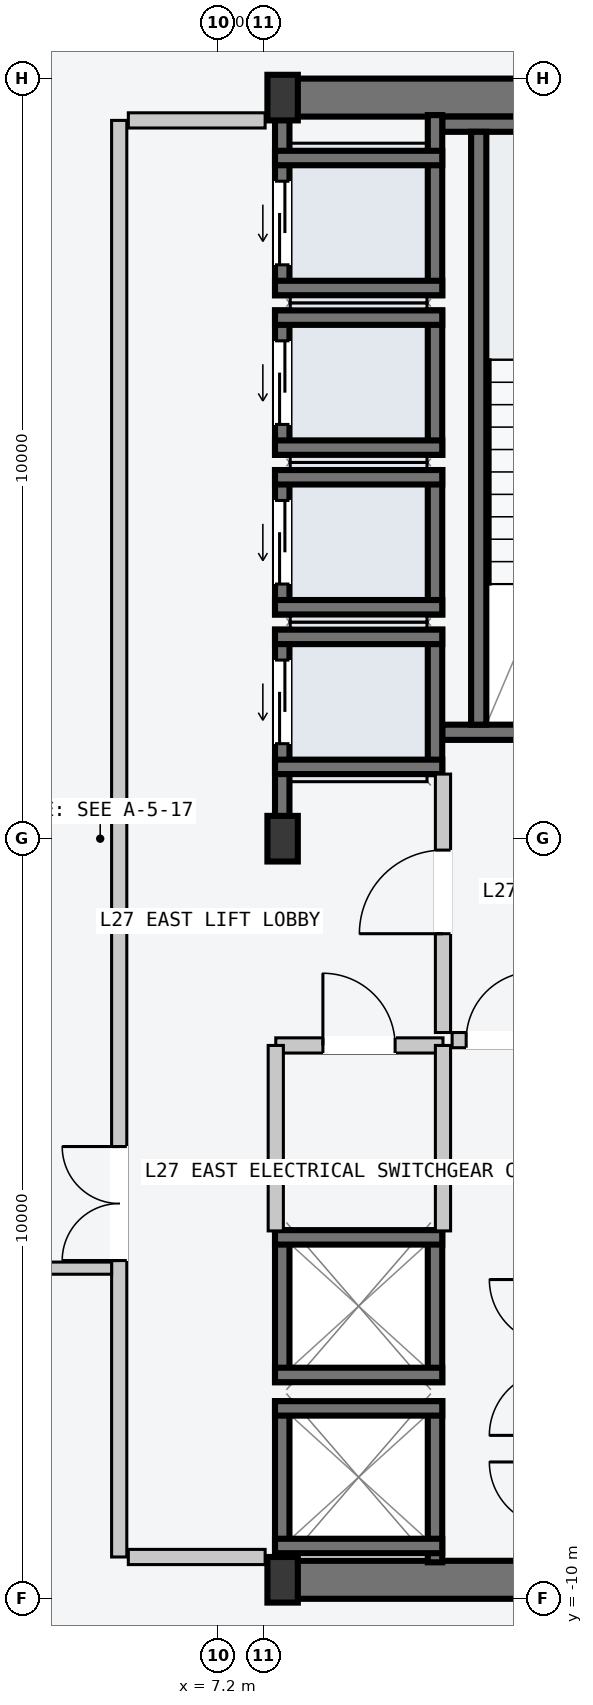
"""IFC4 building model, lengths in metres.
Left out: names, types, materials, properties, quantities, classifications, styles, units other than length and angle.
Written with IfcOpenShell. Run it as: python <this file> out.ifc"""

import sys

from ifc_helpers import new_model, si_unit, direction, frame, frame_2d, origin, origin_2d, place, context, subcontext, project, spatial, rectangle, i_section, extrude, element, fill, save


model = new_model("IFC4")
c1 = context("Model", 3, precision=1e-05, world=origin(), true_north=direction((0.0, 1.0)))
c2 = subcontext(c1, "Body", "Model", "MODEL_VIEW")
j1 = project(units=[si_unit("LENGTHUNIT", "METRE"), si_unit("PLANEANGLEUNIT", "RADIAN")], contexts=[c1])
p1 = place(None, origin())
s1 = spatial("IfcSite", under=j1, at=p1, CompositionType="ELEMENT")
p2 = place(p1, origin())
s2 = spatial("IfcBuilding", under=s1, at=p2, CompositionType="ELEMENT")
p3 = place(p2, frame((0.0, 0.0, 106.2)))
s3 = spatial("IfcBuildingStorey", under=s2, at=p3, CompositionType="ELEMENT", Elevation=106.2)
for number, where, z_axis, x_axis in (
    (1, (8.07, -9.75, -0.2), (0.0, 0.0, 1.0), (1.0, 0.0, 0.0)),
    (2, (8.07, 9.75, -0.2), (0.0, 0.0, 1.0), (1.0, 0.0, 0.0)),
):
    element("IfcWall", number, at=place(p3, frame(where, z_axis=z_axis, x_axis=x_axis)), inside=s3, PredefinedType="SHEAR", context=c2, shape_type="SweptSolid", body=[
        extrude(rectangle(XDim=6.46, YDim=0.5, at=frame_2d((3.23, 0.0))), origin(), (0.0, 0.0, 1.0), 3.6),
    ])
p4 = place(p3, frame((10.15, 1.4, -0.2), z_axis=(0.0, 0.0, 1.0), x_axis=(1.0, 0.0, 0.0)))
e3 = element("IfcWall", 3, at=p4, inside=s3, PredefinedType="SOLIDWALL", context=c2, shape_type="SweptSolid", body=[
    extrude(rectangle(XDim=4.1, YDim=0.2, at=frame_2d((2.05, 0.0))), origin(), (0.0, 0.0, 1.0), 3.6),
])
p5 = place(p4, frame((1.5, 0.0, 0.2)))
e4 = element("IfcOpeningElement", 4, at=p5, cuts=e3, PredefinedType="OPENING", context=c2, shape_type="SweptSolid", body=[
    extrude(rectangle(XDim=1.12, YDim=2.18, at=frame_2d((0.56, 1.09))), frame((0.0, 0.11, 0.0), z_axis=(0.0, -1.0, 0.0), x_axis=(1.0, 0.0, 0.0)), (0.0, 0.0, 1.0), 0.22),
])
p6 = place(p3, frame((10.15, 9.4, -0.2), z_axis=(0.0, 0.0, 1.0), x_axis=(1.0, 0.0, 0.0)))
e5 = element("IfcWall", 5, at=p6, inside=s3, PredefinedType="SOLIDWALL", context=c2, shape_type="SweptSolid", body=[
    extrude(rectangle(XDim=4.1, YDim=0.2, at=frame_2d((2.05, 0.0))), origin(), (0.0, 0.0, 1.0), 3.6),
])
p7 = place(p3, frame((10.63, 1.5, -0.2), z_axis=(0.0, 0.0, 1.0), x_axis=(0.0, 1.0, 0.0)))
e6 = element("IfcWall", 6, at=p7, inside=s3, PredefinedType="SOLIDWALL", context=c2, shape_type="SweptSolid", body=[
    extrude(rectangle(XDim=7.8, YDim=0.2, at=frame_2d((3.9, 0.0))), origin(), (0.0, 0.0, 1.0), 3.6),
])
for number, where, z_axis, x_axis in (
    (7, (8.05, -9.75, 0.0), (0.0, 0.0, 1.0), (1.0, 0.0, 0.0)),
    (8, (8.05, 0.0, 0.0), (0.0, 0.0, 1.0), (1.0, 0.0, 0.0)),
    (9, (8.05, 9.75, 0.0), (0.0, 0.0, 1.0), (1.0, 0.0, 0.0)),
):
    element("IfcColumn", number, at=place(p3, frame(where, z_axis=z_axis, x_axis=x_axis)), inside=s3, PredefinedType="COLUMN", context=c2, shape_type="SweptSolid", body=[
        extrude(i_section(OverallWidth=0.4, OverallDepth=0.6, WebThickness=0.022, FlangeThickness=0.036, at=origin_2d()), origin(), (0.0, 0.0, 1.0), 3.6),
    ])
p8 = place(p3, frame((8.045, 0.21, -0.2), z_axis=(0.0, 0.0, 1.0), x_axis=(0.0, 1.0, 0.0)))
e10 = element("IfcWall", 10, at=p8, inside=s3, PredefinedType="SOLIDWALL", context=c2, shape_type="SweptSolid", body=[
    extrude(rectangle(XDim=2.54, YDim=0.19, at=frame_2d((1.27, 0.0))), origin(), (0.0, 0.0, 1.0), 3.6),
])
p9 = place(p8, frame((1.04, 0.0, 0.2)))
e11 = element("IfcOpeningElement", 11, at=p9, cuts=e10, PredefinedType="OPENING", context=c2, shape_type="SweptSolid", body=[
    extrude(rectangle(XDim=1.1, YDim=2.2, at=frame_2d((0.55, 1.1))), frame((0.0, 0.105, 0.0), z_axis=(0.0, -1.0, 0.0), x_axis=(1.0, 0.0, 0.0)), (0.0, 0.0, 1.0), 0.21),
])
p10 = place(p3, frame((10.055, 0.85, -0.2), z_axis=(0.0, 0.0, 1.0), x_axis=(0.0, 1.0, 0.0)))
e12 = element("IfcWall", 12, at=p10, inside=s3, PredefinedType="SOLIDWALL", context=c2, shape_type="SweptSolid", body=[
    extrude(rectangle(XDim=1.9, YDim=0.19, at=frame_2d((0.95, 0.0))), origin(), (0.0, 0.0, 1.0), 3.6),
])
for number, where, z_axis, x_axis in (
    (13, (7.95, 2.655, -0.2), (0.0, 0.0, 1.0), (1.0, 0.0, 0.0)),
    (14, (7.95, 0.945, -0.2), (0.0, 0.0, 1.0), (1.0, 0.0, 0.0)),
):
    element("IfcWall", number, at=place(p3, frame(where, z_axis=z_axis, x_axis=x_axis)), inside=s3, PredefinedType="SOLIDWALL", context=c2, shape_type="SweptSolid", body=[
        extrude(rectangle(XDim=2.2, YDim=0.19, at=frame_2d((1.1, 0.0))), origin(), (0.0, 0.0, 1.0), 3.6),
    ])
p11 = place(p3, frame((8.045, 2.95, -0.2), z_axis=(0.0, 0.0, 1.0), x_axis=(0.0, 1.0, 0.0)))
e15 = element("IfcWall", 15, at=p11, inside=s3, PredefinedType="SOLIDWALL", context=c2, shape_type="SweptSolid", body=[
    extrude(rectangle(XDim=1.9, YDim=0.19, at=frame_2d((0.95, 0.0))), origin(), (0.0, 0.0, 1.0), 3.6),
])
p12 = place(p11, frame((0.4, 0.0, 0.2)))
e16 = element("IfcOpeningElement", 16, at=p12, cuts=e15, PredefinedType="OPENING", context=c2, shape_type="SweptSolid", body=[
    extrude(rectangle(XDim=1.1, YDim=2.2, at=frame_2d((0.55, 1.1))), frame((0.0, 0.105, 0.0), z_axis=(0.0, -1.0, 0.0), x_axis=(1.0, 0.0, 0.0)), (0.0, 0.0, 1.0), 0.21),
])
p13 = place(p3, frame((10.055, 2.95, -0.2), z_axis=(0.0, 0.0, 1.0), x_axis=(0.0, 1.0, 0.0)))
e17 = element("IfcWall", 17, at=p13, inside=s3, PredefinedType="SOLIDWALL", context=c2, shape_type="SweptSolid", body=[
    extrude(rectangle(XDim=1.9, YDim=0.19, at=frame_2d((0.95, 0.0))), origin(), (0.0, 0.0, 1.0), 3.6),
])
for number, where, z_axis, x_axis in (
    (18, (7.95, 4.755, -0.2), (0.0, 0.0, 1.0), (1.0, 0.0, 0.0)),
    (19, (7.95, 3.045, -0.2), (0.0, 0.0, 1.0), (1.0, 0.0, 0.0)),
):
    element("IfcWall", number, at=place(p3, frame(where, z_axis=z_axis, x_axis=x_axis)), inside=s3, PredefinedType="SOLIDWALL", context=c2, shape_type="SweptSolid", body=[
        extrude(rectangle(XDim=2.2, YDim=0.19, at=frame_2d((1.1, 0.0))), origin(), (0.0, 0.0, 1.0), 3.6),
    ])
p14 = place(p3, frame((8.045, 5.05, -0.2), z_axis=(0.0, 0.0, 1.0), x_axis=(0.0, 1.0, 0.0)))
e20 = element("IfcWall", 20, at=p14, inside=s3, PredefinedType="SOLIDWALL", context=c2, shape_type="SweptSolid", body=[
    extrude(rectangle(XDim=1.9, YDim=0.19, at=frame_2d((0.95, 0.0))), origin(), (0.0, 0.0, 1.0), 3.6),
])
p15 = place(p14, frame((0.4, 0.0, 0.2)))
e21 = element("IfcOpeningElement", 21, at=p15, cuts=e20, PredefinedType="OPENING", context=c2, shape_type="SweptSolid", body=[
    extrude(rectangle(XDim=1.1, YDim=2.2, at=frame_2d((0.55, 1.1))), frame((0.0, 0.105, 0.0), z_axis=(0.0, -1.0, 0.0), x_axis=(1.0, 0.0, 0.0)), (0.0, 0.0, 1.0), 0.21),
])
p16 = place(p3, frame((10.055, 5.05, -0.2), z_axis=(0.0, 0.0, 1.0), x_axis=(0.0, 1.0, 0.0)))
e22 = element("IfcWall", 22, at=p16, inside=s3, PredefinedType="SOLIDWALL", context=c2, shape_type="SweptSolid", body=[
    extrude(rectangle(XDim=1.9, YDim=0.19, at=frame_2d((0.95, 0.0))), origin(), (0.0, 0.0, 1.0), 3.6),
])
for number, where, z_axis, x_axis in (
    (23, (7.95, 6.855, -0.2), (0.0, 0.0, 1.0), (1.0, 0.0, 0.0)),
    (24, (7.95, 5.145, -0.2), (0.0, 0.0, 1.0), (1.0, 0.0, 0.0)),
):
    element("IfcWall", number, at=place(p3, frame(where, z_axis=z_axis, x_axis=x_axis)), inside=s3, PredefinedType="SOLIDWALL", context=c2, shape_type="SweptSolid", body=[
        extrude(rectangle(XDim=2.2, YDim=0.19, at=frame_2d((1.1, 0.0))), origin(), (0.0, 0.0, 1.0), 3.6),
    ])
p17 = place(p3, frame((8.045, 7.15, -0.2), z_axis=(0.0, 0.0, 1.0), x_axis=(0.0, 1.0, 0.0)))
e25 = element("IfcWall", 25, at=p17, inside=s3, PredefinedType="SOLIDWALL", context=c2, shape_type="SweptSolid", body=[
    extrude(rectangle(XDim=2.37, YDim=0.19, at=frame_2d((1.185, 0.0))), origin(), (0.0, 0.0, 1.0), 3.6),
])
p18 = place(p17, frame((0.4, 0.0, 0.2)))
e26 = element("IfcOpeningElement", 26, at=p18, cuts=e25, PredefinedType="OPENING", context=c2, shape_type="SweptSolid", body=[
    extrude(rectangle(XDim=1.1, YDim=2.2, at=frame_2d((0.55, 1.1))), frame((0.0, 0.105, 0.0), z_axis=(0.0, -1.0, 0.0), x_axis=(1.0, 0.0, 0.0)), (0.0, 0.0, 1.0), 0.21),
])
p19 = place(p3, frame((10.055, 7.15, -0.2), z_axis=(0.0, 0.0, 1.0), x_axis=(0.0, 1.0, 0.0)))
e27 = element("IfcWall", 27, at=p19, inside=s3, PredefinedType="SOLIDWALL", context=c2, shape_type="SweptSolid", body=[
    extrude(rectangle(XDim=2.37, YDim=0.19, at=frame_2d((1.185, 0.0))), origin(), (0.0, 0.0, 1.0), 3.6),
])
for number, where, z_axis, x_axis in (
    (28, (7.95, 8.955, -0.2), (0.0, 0.0, 1.0), (1.0, 0.0, 0.0)),
    (29, (7.95, 7.245, -0.2), (0.0, 0.0, 1.0), (1.0, 0.0, 0.0)),
):
    element("IfcWall", number, at=place(p3, frame(where, z_axis=z_axis, x_axis=x_axis)), inside=s3, PredefinedType="SOLIDWALL", context=c2, shape_type="SweptSolid", body=[
        extrude(rectangle(XDim=2.2, YDim=0.19, at=frame_2d((1.1, 0.0))), origin(), (0.0, 0.0, 1.0), 3.6),
    ])
for number, where, z_axis, x_axis in (
    (30, (8.045, -9.52, -0.2), (0.0, 0.0, 1.0), (0.0, 1.0, 0.0)),
    (31, (10.055, -9.52, -0.2), (0.0, 0.0, 1.0), (0.0, 1.0, 0.0)),
):
    element("IfcWall", number, at=place(p3, frame(where, z_axis=z_axis, x_axis=x_axis)), inside=s3, PredefinedType="SOLIDWALL", context=c2, shape_type="SweptSolid", body=[
        extrude(rectangle(XDim=2.12, YDim=0.19, at=frame_2d((1.06, 0.0))), origin(), (0.0, 0.0, 1.0), 3.6),
    ])
for number, where, z_axis, x_axis in (
    (32, (7.95, -7.495, -0.2), (0.0, 0.0, 1.0), (1.0, 0.0, 0.0)),
    (33, (7.95, -9.305, -0.2), (0.0, 0.0, 1.0), (1.0, 0.0, 0.0)),
):
    element("IfcWall", number, at=place(p3, frame(where, z_axis=z_axis, x_axis=x_axis)), inside=s3, PredefinedType="SOLIDWALL", context=c2, shape_type="SweptSolid", body=[
        extrude(rectangle(XDim=2.2, YDim=0.19, at=frame_2d((1.1, 0.0))), origin(), (0.0, 0.0, 1.0), 3.6),
    ])
for number, where, z_axis, x_axis in (
    (34, (8.045, -7.15, -0.2), (0.0, 0.0, 1.0), (0.0, 1.0, 0.0)),
    (35, (10.055, -7.15, -0.2), (0.0, 0.0, 1.0), (0.0, 1.0, 0.0)),
):
    element("IfcWall", number, at=place(p3, frame(where, z_axis=z_axis, x_axis=x_axis)), inside=s3, PredefinedType="SOLIDWALL", context=c2, shape_type="SweptSolid", body=[
        extrude(rectangle(XDim=2.0, YDim=0.19, at=frame_2d((1.0, 0.0))), origin(), (0.0, 0.0, 1.0), 3.6),
    ])
for number, where, z_axis, x_axis in (
    (36, (7.95, -5.245, -0.2), (0.0, 0.0, 1.0), (1.0, 0.0, 0.0)),
    (37, (7.95, -7.055, -0.2), (0.0, 0.0, 1.0), (1.0, 0.0, 0.0)),
):
    element("IfcWall", number, at=place(p3, frame(where, z_axis=z_axis, x_axis=x_axis)), inside=s3, PredefinedType="SOLIDWALL", context=c2, shape_type="SweptSolid", body=[
        extrude(rectangle(XDim=2.2, YDim=0.19, at=frame_2d((1.1, 0.0))), origin(), (0.0, 0.0, 1.0), 3.6),
    ])
p20 = place(p3, frame((5.9, -9.45, 0.0), z_axis=(0.0, 0.0, 1.0), x_axis=(0.0, 1.0, 0.0)))
e38 = element("IfcWall", 38, at=p20, inside=s3, PredefinedType="PARTITIONING", context=c2, shape_type="SweptSolid", body=[
    extrude(rectangle(XDim=18.9, YDim=0.2, at=frame_2d((9.45, 0.0))), origin(), (0.0, 0.0, 1.0), 3.4),
])
p21 = place(p20, frame((3.9, 0.0, 0.0)))
e39 = element("IfcOpeningElement", 39, at=p21, cuts=e38, PredefinedType="OPENING", context=c2, shape_type="SweptSolid", body=[
    extrude(rectangle(XDim=1.5, YDim=2.2, at=frame_2d((0.75, 1.1))), frame((0.0, 0.11, 0.0), z_axis=(0.0, -1.0, 0.0), x_axis=(1.0, 0.0, 0.0)), (0.0, 0.0, 1.0), 0.22),
])
for number, where, z_axis, x_axis in (
    (40, (6.02, -9.45, 0.0), (0.0, 0.0, 1.0), (1.0, 0.0, 0.0)),
    (41, (6.02, 9.45, 0.0), (0.0, 0.0, 1.0), (1.0, 0.0, 0.0)),
):
    element("IfcWall", number, at=place(p3, frame(where, z_axis=z_axis, x_axis=x_axis)), inside=s3, PredefinedType="PARTITIONING", context=c2, shape_type="SweptSolid", body=[
        extrude(rectangle(XDim=1.8, YDim=0.2, at=frame_2d((0.9, 0.0))), origin(), (0.0, 0.0, 1.0), 3.4),
    ])
p22 = place(p3, frame((10.16, -2.55, 0.0), z_axis=(0.0, 0.0, 1.0), x_axis=(0.0, 1.0, 0.0)))
e42 = element("IfcWall", 42, at=p22, inside=s3, PredefinedType="PARTITIONING", context=c2, shape_type="SweptSolid", body=[
    extrude(rectangle(XDim=3.4, YDim=0.2, at=frame_2d((1.7, 0.0))), origin(), (0.0, 0.0, 1.0), 3.4),
])
p23 = place(p22, frame((1.3, 0.0, 0.0)))
e43 = element("IfcOpeningElement", 43, at=p23, cuts=e42, PredefinedType="OPENING", context=c2, shape_type="SweptSolid", body=[
    extrude(rectangle(XDim=1.1, YDim=2.15, at=frame_2d((0.55, 1.075))), frame((0.0, 0.11, 0.0), z_axis=(0.0, -1.0, 0.0), x_axis=(1.0, 0.0, 0.0)), (0.0, 0.0, 1.0), 0.22),
])
p24 = place(p3, frame((10.28, -2.65, 0.0), z_axis=(0.0, 0.0, 1.0), x_axis=(1.0, 0.0, 0.0)))
e44 = element("IfcWall", 44, at=p24, inside=s3, PredefinedType="PARTITIONING", context=c2, shape_type="SweptSolid", body=[
    extrude(rectangle(XDim=1.27, YDim=0.2, at=frame_2d((0.635, 0.0))), origin(), (0.0, 0.0, 1.0), 3.4),
])
p25 = place(p24, frame((0.185, 0.0, 0.0)))
e45 = element("IfcOpeningElement", 45, at=p25, cuts=e44, PredefinedType="OPENING", context=c2, shape_type="SweptSolid", body=[
    extrude(rectangle(XDim=0.9, YDim=2.15, at=frame_2d((0.45, 1.075))), frame((0.0, 0.11, 0.0), z_axis=(0.0, -1.0, 0.0), x_axis=(1.0, 0.0, 0.0)), (0.0, 0.0, 1.0), 0.22),
])
p26 = place(p3, frame((7.96, -2.72, 0.0), z_axis=(0.0, 0.0, 1.0), x_axis=(1.0, 0.0, 0.0)))
e46 = element("IfcWall", 46, at=p26, inside=s3, PredefinedType="PARTITIONING", context=c2, shape_type="SweptSolid", body=[
    extrude(rectangle(XDim=2.2, YDim=0.2, at=frame_2d((1.1, 0.0))), origin(), (0.0, 0.0, 1.0), 3.4),
])
p27 = place(p26, frame((0.62, 0.0, 0.0)))
e47 = element("IfcOpeningElement", 47, at=p27, cuts=e46, PredefinedType="OPENING", context=c2, shape_type="SweptSolid", body=[
    extrude(rectangle(XDim=0.95, YDim=2.1, at=frame_2d((0.475, 1.05))), frame((0.0, 0.11, 0.0), z_axis=(0.0, -1.0, 0.0), x_axis=(1.0, 0.0, 0.0)), (0.0, 0.0, 1.0), 0.22),
])
for number, where, z_axis, x_axis in (
    (48, (7.96, -5.16, 0.0), (0.0, 0.0, 1.0), (0.0, 1.0, 0.0)),
    (49, (10.16, -5.16, 0.0), (0.0, 0.0, 1.0), (0.0, 1.0, 0.0)),
):
    element("IfcWall", number, at=place(p3, frame(where, z_axis=z_axis, x_axis=x_axis)), inside=s3, PredefinedType="PARTITIONING", context=c2, shape_type="SweptSolid", body=[
        extrude(rectangle(XDim=2.44, YDim=0.2, at=frame_2d((1.22, 0.0))), origin(), (0.0, 0.0, 1.0), 3.4),
    ])
p28 = place(p3, frame((-5.8, -5.65, 0.0), z_axis=(0.0, 0.0, 1.0), x_axis=(1.0, 0.0, 0.0)))
e50 = element("IfcWall", 50, at=p28, inside=s3, PredefinedType="PARTITIONING", context=c2, shape_type="SweptSolid", body=[
    extrude(rectangle(XDim=11.6, YDim=0.16, at=frame_2d((5.8, 0.0))), origin(), (0.0, 0.0, 1.0), 3.4),
])
p29 = place(p28, frame((5.1, 0.0, 0.0)))
e51 = element("IfcOpeningElement", 51, at=p29, cuts=e50, PredefinedType="OPENING", context=c2, shape_type="SweptSolid", body=[
    extrude(rectangle(XDim=1.4, YDim=2.2, at=frame_2d((0.7, 1.1))), frame((0.0, 0.09, 0.0), z_axis=(0.0, -1.0, 0.0), x_axis=(1.0, 0.0, 0.0)), (0.0, 0.0, 1.0), 0.18),
])
p30 = place(p9, origin())
e52 = element("IfcDoor", 52, at=p30, inside=s3, OperationType="SLIDING_TO_LEFT", PredefinedType="DOOR", context=c2, shape_type="SweptSolid", body=[
    extrude(rectangle(XDim=1.1, YDim=2.2, at=frame_2d((0.55, 1.1))), frame((0.0, 0.025, 0.0), z_axis=(0.0, -1.0, 0.0), x_axis=(1.0, 0.0, 0.0)), (0.0, 0.0, 1.0), 0.05),
])
fill(e11, e52)
p31 = place(p12, origin())
e53 = element("IfcDoor", 53, at=p31, inside=s3, OperationType="SLIDING_TO_LEFT", PredefinedType="DOOR", context=c2, shape_type="SweptSolid", body=[
    extrude(rectangle(XDim=1.1, YDim=2.2, at=frame_2d((0.55, 1.1))), frame((0.0, 0.025, 0.0), z_axis=(0.0, -1.0, 0.0), x_axis=(1.0, 0.0, 0.0)), (0.0, 0.0, 1.0), 0.05),
])
fill(e16, e53)
p32 = place(p15, origin())
e54 = element("IfcDoor", 54, at=p32, inside=s3, OperationType="SLIDING_TO_LEFT", PredefinedType="DOOR", context=c2, shape_type="SweptSolid", body=[
    extrude(rectangle(XDim=1.1, YDim=2.2, at=frame_2d((0.55, 1.1))), frame((0.0, 0.025, 0.0), z_axis=(0.0, -1.0, 0.0), x_axis=(1.0, 0.0, 0.0)), (0.0, 0.0, 1.0), 0.05),
])
fill(e21, e54)
p33 = place(p18, origin())
e55 = element("IfcDoor", 55, at=p33, inside=s3, OperationType="SLIDING_TO_LEFT", PredefinedType="DOOR", context=c2, shape_type="SweptSolid", body=[
    extrude(rectangle(XDim=1.1, YDim=2.2, at=frame_2d((0.55, 1.1))), frame((0.0, 0.025, 0.0), z_axis=(0.0, -1.0, 0.0), x_axis=(1.0, 0.0, 0.0)), (0.0, 0.0, 1.0), 0.05),
])
fill(e26, e55)
p34 = place(p21, origin())
e56 = element("IfcDoor", 56, at=p34, inside=s3, OperationType="DOUBLE_DOOR_SINGLE_SWING", PredefinedType="DOOR", context=c2, shape_type="SweptSolid", body=[
    extrude(rectangle(XDim=1.5, YDim=2.2, at=frame_2d((0.75, 1.1))), frame((0.0, 0.025, 0.0), z_axis=(0.0, -1.0, 0.0), x_axis=(1.0, 0.0, 0.0)), (0.0, 0.0, 1.0), 0.05),
])
fill(e39, e56)
p35 = place(p23, origin())
e57 = element("IfcDoor", 57, at=p35, inside=s3, OperationType="SINGLE_SWING_LEFT", PredefinedType="DOOR", context=c2, shape_type="SweptSolid", body=[
    extrude(rectangle(XDim=1.1, YDim=2.15, at=frame_2d((0.55, 1.075))), frame((0.0, 0.025, 0.0), z_axis=(0.0, -1.0, 0.0), x_axis=(1.0, 0.0, 0.0)), (0.0, 0.0, 1.0), 0.05),
])
fill(e43, e57)
p36 = place(p25, origin())
e58 = element("IfcDoor", 58, at=p36, inside=s3, OperationType="SINGLE_SWING_RIGHT", PredefinedType="DOOR", context=c2, shape_type="SweptSolid", body=[
    extrude(rectangle(XDim=0.9, YDim=2.15, at=frame_2d((0.45, 1.075))), frame((0.0, 0.025, 0.0), z_axis=(0.0, -1.0, 0.0), x_axis=(1.0, 0.0, 0.0)), (0.0, 0.0, 1.0), 0.05),
])
fill(e45, e58)
p37 = place(p27, origin())
e59 = element("IfcDoor", 59, at=p37, inside=s3, OperationType="SINGLE_SWING_LEFT", PredefinedType="DOOR", context=c2, shape_type="SweptSolid", body=[
    extrude(rectangle(XDim=0.95, YDim=2.1, at=frame_2d((0.475, 1.05))), frame((0.0, 0.025, 0.0), z_axis=(0.0, -1.0, 0.0), x_axis=(1.0, 0.0, 0.0)), (0.0, 0.0, 1.0), 0.05),
])
fill(e47, e59)
save(model, sys.argv[1])
